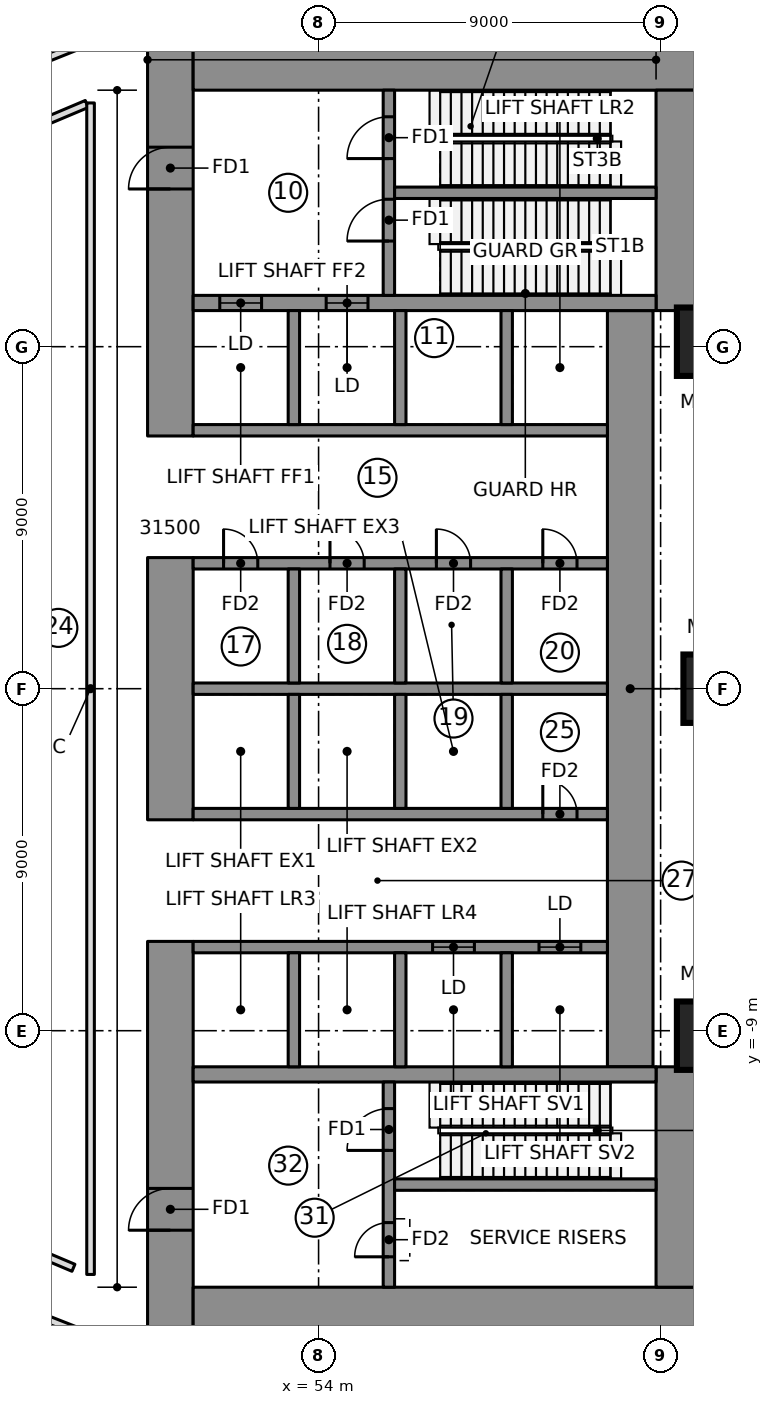
"""IFC4 building model, lengths in metres.
Left out: names, types, materials, properties, quantities, classifications, styles, units other than length and angle.
Written with IfcOpenShell. Run it as: python <this file> out.ifc"""

import sys

from ifc_helpers import new_model, si_unit, direction, frame, frame_2d, origin, origin_2d, place, context, subcontext, project, spatial, rectangle, extrude, element, fill, save


model = new_model("IFC4")
c1 = context("Model", 3, precision=1e-05, world=origin(), true_north=direction((0.0, 1.0)))
c2 = subcontext(c1, "Body", "Model", "MODEL_VIEW")
j1 = project(units=[si_unit("LENGTHUNIT", "METRE"), si_unit("PLANEANGLEUNIT", "RADIAN")], contexts=[c1])
p1 = place(None, origin())
s1 = spatial("IfcSite", under=j1, at=p1, CompositionType="ELEMENT")
p2 = place(p1, origin())
s2 = spatial("IfcBuilding", under=s1, at=p2, CompositionType="ELEMENT")
p3 = place(p2, frame((0.0, 0.0, 29.0)))
s3 = spatial("IfcBuildingStorey", under=s2, at=p3, CompositionType="ELEMENT", Elevation=29.0)
p4 = place(p3, frame((50.1, 6.65, 0.0), z_axis=(0.0, 0.0, 1.0), x_axis=(0.0, 1.0, 0.0)))
e1 = element("IfcWall", 1, at=p4, inside=s3, PredefinedType="SHEAR", context=c2, shape_type="SweptSolid", body=[
    extrude(rectangle(XDim=10.3, YDim=1.2, at=frame_2d((5.15, 0.0))), origin(), (0.0, 0.0, 1.0), 6.0),
])
p5 = place(p4, frame((6.5, 0.0, 0.0)))
e2 = element("IfcOpeningElement", 2, at=p5, cuts=e1, PredefinedType="OPENING", context=c2, shape_type="SweptSolid", body=[
    extrude(rectangle(XDim=1.1, YDim=2.1, at=frame_2d((0.55, 1.05))), frame((0.0, 0.61, 0.0), z_axis=(0.0, -1.0, 0.0), x_axis=(1.0, 0.0, 0.0)), (0.0, 0.0, 1.0), 1.22),
])
p6 = place(p3, frame((50.1, -3.45, 0.0), z_axis=(0.0, 0.0, 1.0), x_axis=(0.0, 1.0, 0.0)))
e3 = element("IfcWall", 3, at=p6, inside=s3, PredefinedType="SHEAR", context=c2, shape_type="SweptSolid", body=[
    extrude(rectangle(XDim=6.9, YDim=1.2, at=frame_2d((3.45, 0.0))), origin(), (0.0, 0.0, 1.0), 6.0),
])
p7 = place(p3, frame((50.1, -16.95, 0.0), z_axis=(0.0, 0.0, 1.0), x_axis=(0.0, 1.0, 0.0)))
e4 = element("IfcWall", 4, at=p7, inside=s3, PredefinedType="SHEAR", context=c2, shape_type="SweptSolid", body=[
    extrude(rectangle(XDim=10.3, YDim=1.2, at=frame_2d((5.15, 0.0))), origin(), (0.0, 0.0, 1.0), 6.0),
])
p8 = place(p7, frame((2.7, 0.0, 0.0)))
e5 = element("IfcOpeningElement", 5, at=p8, cuts=e4, PredefinedType="OPENING", context=c2, shape_type="SweptSolid", body=[
    extrude(rectangle(XDim=1.1, YDim=2.1, at=frame_2d((0.55, 1.05))), frame((0.0, 0.61, 0.0), z_axis=(0.0, -1.0, 0.0), x_axis=(1.0, 0.0, 0.0)), (0.0, 0.0, 1.0), 1.22),
])
for number, where, z_axis, x_axis in (
    (6, (50.7, 16.35, 0.0), (0.0, 0.0, 1.0), (1.0, 0.0, 0.0)),
    (7, (50.7, -16.35, 0.0), (0.0, 0.0, 1.0), (1.0, 0.0, 0.0)),
):
    element("IfcWall", number, at=place(p3, frame(where, z_axis=z_axis, x_axis=x_axis)), inside=s3, PredefinedType="SHEAR", context=c2, shape_type="SweptSolid", body=[
        extrude(rectangle(XDim=13.38, YDim=1.2, at=frame_2d((6.69, 0.0))), origin(), (0.0, 0.0, 1.0), 6.0),
    ])
for number, where, z_axis, x_axis in (
    (8, (63.48, 9.95, 0.0), (0.0, 0.0, 1.0), (0.0, 1.0, 0.0)),
    (9, (63.48, -15.75, 0.0), (0.0, 0.0, 1.0), (0.0, 1.0, 0.0)),
):
    element("IfcWall", number, at=place(p3, frame(where, z_axis=z_axis, x_axis=x_axis)), inside=s3, PredefinedType="SHEAR", context=c2, shape_type="SweptSolid", body=[
        extrude(rectangle(XDim=5.8, YDim=1.2, at=frame_2d((2.9, 0.0))), origin(), (0.0, 0.0, 1.0), 6.0),
    ])
p9 = place(p3, frame((62.2, -9.95, 0.0), z_axis=(0.0, 0.0, 1.0), x_axis=(0.0, 1.0, 0.0)))
e10 = element("IfcWall", 10, at=p9, inside=s3, PredefinedType="SHEAR", context=c2, shape_type="SweptSolid", body=[
    extrude(rectangle(XDim=19.9, YDim=1.2, at=frame_2d((9.95, 0.0))), origin(), (0.0, 0.0, 1.0), 6.0),
])
p10 = place(p3, frame((50.7, 10.15, 0.0), z_axis=(0.0, 0.0, 1.0), x_axis=(1.0, 0.0, 0.0)))
e11 = element("IfcWall", 11, at=p10, inside=s3, PredefinedType="SHEAR", context=c2, shape_type="SweptSolid", body=[
    extrude(rectangle(XDim=12.18, YDim=0.4, at=frame_2d((6.09, 0.0))), origin(), (0.0, 0.0, 1.0), 6.0),
])
p11 = place(p10, frame((0.7, 0.0, 0.0)))
e12 = element("IfcOpeningElement", 12, at=p11, cuts=e11, PredefinedType="OPENING", context=c2, shape_type="SweptSolid", body=[
    extrude(rectangle(XDim=1.1, YDim=2.1, at=frame_2d((0.55, 1.05))), frame((0.0, 0.21, 0.0), z_axis=(0.0, -1.0, 0.0), x_axis=(1.0, 0.0, 0.0)), (0.0, 0.0, 1.0), 0.42),
])
p12 = place(p10, frame((3.5, 0.0, 0.0)))
e13 = element("IfcOpeningElement", 13, at=p12, cuts=e11, PredefinedType="OPENING", context=c2, shape_type="SweptSolid", body=[
    extrude(rectangle(XDim=1.1, YDim=2.1, at=frame_2d((0.55, 1.05))), frame((0.0, 0.21, 0.0), z_axis=(0.0, -1.0, 0.0), x_axis=(1.0, 0.0, 0.0)), (0.0, 0.0, 1.0), 0.42),
])
p13 = place(p3, frame((50.7, -10.15, 0.0), z_axis=(0.0, 0.0, 1.0), x_axis=(1.0, 0.0, 0.0)))
e14 = element("IfcWall", 14, at=p13, inside=s3, PredefinedType="SHEAR", context=c2, shape_type="SweptSolid", body=[
    extrude(rectangle(XDim=12.18, YDim=0.4, at=frame_2d((6.09, 0.0))), origin(), (0.0, 0.0, 1.0), 6.0),
])
p14 = place(p3, frame((50.7, 0.0, 0.0), z_axis=(0.0, 0.0, 1.0), x_axis=(1.0, 0.0, 0.0)))
e15 = element("IfcWall", 15, at=p14, inside=s3, PredefinedType="SHEAR", context=c2, shape_type="SweptSolid", body=[
    extrude(rectangle(XDim=10.9, YDim=0.3, at=frame_2d((5.45, 0.0))), origin(), (0.0, 0.0, 1.0), 6.0),
])
p15 = place(p3, frame((50.7, 3.3, 0.0), z_axis=(0.0, 0.0, 1.0), x_axis=(1.0, 0.0, 0.0)))
e16 = element("IfcWall", 16, at=p15, inside=s3, PredefinedType="SHEAR", context=c2, shape_type="SweptSolid", body=[
    extrude(rectangle(XDim=10.9, YDim=0.3, at=frame_2d((5.45, 0.0))), origin(), (0.0, 0.0, 1.0), 6.0),
])
p16 = place(p15, frame((0.8, 0.0, 0.0)))
e17 = element("IfcOpeningElement", 17, at=p16, cuts=e16, PredefinedType="OPENING", context=c2, shape_type="SweptSolid", body=[
    extrude(rectangle(XDim=0.9, YDim=2.1, at=frame_2d((0.45, 1.05))), frame((0.0, 0.16, 0.0), z_axis=(0.0, -1.0, 0.0), x_axis=(1.0, 0.0, 0.0)), (0.0, 0.0, 1.0), 0.32),
])
p17 = place(p15, frame((3.6, 0.0, 0.0)))
e18 = element("IfcOpeningElement", 18, at=p17, cuts=e16, PredefinedType="OPENING", context=c2, shape_type="SweptSolid", body=[
    extrude(rectangle(XDim=0.9, YDim=2.1, at=frame_2d((0.45, 1.05))), frame((0.0, 0.16, 0.0), z_axis=(0.0, -1.0, 0.0), x_axis=(1.0, 0.0, 0.0)), (0.0, 0.0, 1.0), 0.32),
])
p18 = place(p15, frame((6.4, 0.0, 0.0)))
e19 = element("IfcOpeningElement", 19, at=p18, cuts=e16, PredefinedType="OPENING", context=c2, shape_type="SweptSolid", body=[
    extrude(rectangle(XDim=0.9, YDim=2.1, at=frame_2d((0.45, 1.05))), frame((0.0, 0.16, 0.0), z_axis=(0.0, -1.0, 0.0), x_axis=(1.0, 0.0, 0.0)), (0.0, 0.0, 1.0), 0.32),
])
p19 = place(p15, frame((9.2, 0.0, 0.0)))
e20 = element("IfcOpeningElement", 20, at=p19, cuts=e16, PredefinedType="OPENING", context=c2, shape_type="SweptSolid", body=[
    extrude(rectangle(XDim=0.9, YDim=2.1, at=frame_2d((0.45, 1.05))), frame((0.0, 0.16, 0.0), z_axis=(0.0, -1.0, 0.0), x_axis=(1.0, 0.0, 0.0)), (0.0, 0.0, 1.0), 0.32),
])
p20 = place(p3, frame((50.7, 6.8, 0.0), z_axis=(0.0, 0.0, 1.0), x_axis=(1.0, 0.0, 0.0)))
e21 = element("IfcWall", 21, at=p20, inside=s3, PredefinedType="SHEAR", context=c2, shape_type="SweptSolid", body=[
    extrude(rectangle(XDim=10.9, YDim=0.3, at=frame_2d((5.45, 0.0))), origin(), (0.0, 0.0, 1.0), 6.0),
])
for number, where, z_axis, x_axis in (
    (22, (53.35, 0.15, 0.0), (0.0, 0.0, 1.0), (0.0, 1.0, 0.0)),
    (23, (53.35, 6.95, 0.0), (0.0, 0.0, 1.0), (0.0, 1.0, 0.0)),
    (24, (56.15, 0.15, 0.0), (0.0, 0.0, 1.0), (0.0, 1.0, 0.0)),
    (25, (56.15, 6.95, 0.0), (0.0, 0.0, 1.0), (0.0, 1.0, 0.0)),
    (26, (58.95, 0.15, 0.0), (0.0, 0.0, 1.0), (0.0, 1.0, 0.0)),
    (27, (58.95, 6.95, 0.0), (0.0, 0.0, 1.0), (0.0, 1.0, 0.0)),
):
    element("IfcWall", number, at=place(p3, frame(where, z_axis=z_axis, x_axis=x_axis)), inside=s3, PredefinedType="SHEAR", context=c2, shape_type="SweptSolid", body=[
        extrude(rectangle(XDim=3.0, YDim=0.3, at=frame_2d((1.5, 0.0))), origin(), (0.0, 0.0, 1.0), 6.0),
    ])
p21 = place(p3, frame((50.7, -3.3, 0.0), z_axis=(0.0, 0.0, 1.0), x_axis=(1.0, 0.0, 0.0)))
e28 = element("IfcWall", 28, at=p21, inside=s3, PredefinedType="SHEAR", context=c2, shape_type="SweptSolid", body=[
    extrude(rectangle(XDim=10.9, YDim=0.3, at=frame_2d((5.45, 0.0))), origin(), (0.0, 0.0, 1.0), 6.0),
])
p22 = place(p21, frame((9.2, 0.0, 0.0)))
e29 = element("IfcOpeningElement", 29, at=p22, cuts=e28, PredefinedType="OPENING", context=c2, shape_type="SweptSolid", body=[
    extrude(rectangle(XDim=0.9, YDim=2.1, at=frame_2d((0.45, 1.05))), frame((0.0, 0.16, 0.0), z_axis=(0.0, -1.0, 0.0), x_axis=(1.0, 0.0, 0.0)), (0.0, 0.0, 1.0), 0.32),
])
p23 = place(p3, frame((50.7, -6.8, 0.0), z_axis=(0.0, 0.0, 1.0), x_axis=(1.0, 0.0, 0.0)))
e30 = element("IfcWall", 30, at=p23, inside=s3, PredefinedType="SHEAR", context=c2, shape_type="SweptSolid", body=[
    extrude(rectangle(XDim=10.9, YDim=0.3, at=frame_2d((5.45, 0.0))), origin(), (0.0, 0.0, 1.0), 6.0),
])
p24 = place(p23, frame((6.3, 0.0, 0.0)))
e31 = element("IfcOpeningElement", 31, at=p24, cuts=e30, PredefinedType="OPENING", context=c2, shape_type="SweptSolid", body=[
    extrude(rectangle(XDim=1.1, YDim=2.1, at=frame_2d((0.55, 1.05))), frame((0.0, 0.16, 0.0), z_axis=(0.0, -1.0, 0.0), x_axis=(1.0, 0.0, 0.0)), (0.0, 0.0, 1.0), 0.32),
])
p25 = place(p23, frame((9.1, 0.0, 0.0)))
e32 = element("IfcOpeningElement", 32, at=p25, cuts=e30, PredefinedType="OPENING", context=c2, shape_type="SweptSolid", body=[
    extrude(rectangle(XDim=1.1, YDim=2.1, at=frame_2d((0.55, 1.05))), frame((0.0, 0.16, 0.0), z_axis=(0.0, -1.0, 0.0), x_axis=(1.0, 0.0, 0.0)), (0.0, 0.0, 1.0), 0.32),
])
for number, where, z_axis, x_axis in (
    (33, (53.35, -3.15, 0.0), (0.0, 0.0, 1.0), (0.0, 1.0, 0.0)),
    (34, (53.35, -9.95, 0.0), (0.0, 0.0, 1.0), (0.0, 1.0, 0.0)),
    (35, (56.15, -3.15, 0.0), (0.0, 0.0, 1.0), (0.0, 1.0, 0.0)),
    (36, (56.15, -9.95, 0.0), (0.0, 0.0, 1.0), (0.0, 1.0, 0.0)),
    (37, (58.95, -3.15, 0.0), (0.0, 0.0, 1.0), (0.0, 1.0, 0.0)),
    (38, (58.95, -9.95, 0.0), (0.0, 0.0, 1.0), (0.0, 1.0, 0.0)),
):
    element("IfcWall", number, at=place(p3, frame(where, z_axis=z_axis, x_axis=x_axis)), inside=s3, PredefinedType="SHEAR", context=c2, shape_type="SweptSolid", body=[
        extrude(rectangle(XDim=3.0, YDim=0.3, at=frame_2d((1.5, 0.0))), origin(), (0.0, 0.0, 1.0), 6.0),
    ])
p26 = place(p3, frame((55.85, 10.35, 0.0), z_axis=(0.0, 0.0, 1.0), x_axis=(0.0, 1.0, 0.0)))
e39 = element("IfcWall", 39, at=p26, inside=s3, PredefinedType="SHEAR", context=c2, shape_type="SweptSolid", body=[
    extrude(rectangle(XDim=5.4, YDim=0.3, at=frame_2d((2.7, 0.0))), origin(), (0.0, 0.0, 1.0), 6.0),
])
p27 = place(p26, frame((1.43, 0.0, 0.0)))
e40 = element("IfcOpeningElement", 40, at=p27, cuts=e39, PredefinedType="OPENING", context=c2, shape_type="SweptSolid", body=[
    extrude(rectangle(XDim=1.1, YDim=2.1, at=frame_2d((0.55, 1.05))), frame((0.0, 0.16, 0.0), z_axis=(0.0, -1.0, 0.0), x_axis=(1.0, 0.0, 0.0)), (0.0, 0.0, 1.0), 0.32),
])
p28 = place(p26, frame((3.6, 0.0, 0.0)))
e41 = element("IfcOpeningElement", 41, at=p28, cuts=e39, PredefinedType="OPENING", context=c2, shape_type="SweptSolid", body=[
    extrude(rectangle(XDim=1.1, YDim=2.1, at=frame_2d((0.55, 1.05))), frame((0.0, 0.16, 0.0), z_axis=(0.0, -1.0, 0.0), x_axis=(1.0, 0.0, 0.0)), (0.0, 0.0, 1.0), 0.32),
])
p29 = place(p3, frame((55.85, -15.75, 0.0), z_axis=(0.0, 0.0, 1.0), x_axis=(0.0, 1.0, 0.0)))
e42 = element("IfcWall", 42, at=p29, inside=s3, PredefinedType="SHEAR", context=c2, shape_type="SweptSolid", body=[
    extrude(rectangle(XDim=5.4, YDim=0.3, at=frame_2d((2.7, 0.0))), origin(), (0.0, 0.0, 1.0), 6.0),
])
p30 = place(p29, frame((3.6, 0.0, 0.0)))
e43 = element("IfcOpeningElement", 43, at=p30, cuts=e42, PredefinedType="OPENING", context=c2, shape_type="SweptSolid", body=[
    extrude(rectangle(XDim=1.1, YDim=2.1, at=frame_2d((0.55, 1.05))), frame((0.0, 0.16, 0.0), z_axis=(0.0, -1.0, 0.0), x_axis=(1.0, 0.0, 0.0)), (0.0, 0.0, 1.0), 0.32),
])
p31 = place(p29, frame((0.8, 0.0, 0.0)))
e44 = element("IfcOpeningElement", 44, at=p31, cuts=e42, PredefinedType="OPENING", context=c2, shape_type="SweptSolid", body=[
    extrude(rectangle(XDim=0.9, YDim=2.1, at=frame_2d((0.45, 1.05))), frame((0.0, 0.16, 0.0), z_axis=(0.0, -1.0, 0.0), x_axis=(1.0, 0.0, 0.0)), (0.0, 0.0, 1.0), 0.32),
])
for number, where, z_axis, x_axis in (
    (45, (56.0, 13.05, 0.0), (0.0, 0.0, 1.0), (1.0, 0.0, 0.0)),
    (46, (56.0, -13.05, 0.0), (0.0, 0.0, 1.0), (1.0, 0.0, 0.0)),
):
    element("IfcWall", number, at=place(p3, frame(where, z_axis=z_axis, x_axis=x_axis)), inside=s3, PredefinedType="SHEAR", context=c2, shape_type="SweptSolid", body=[
        extrude(rectangle(XDim=6.88, YDim=0.3, at=frame_2d((3.44, 0.0))), origin(), (0.0, 0.0, 1.0), 6.0),
    ])
for number, where, z_axis, x_axis in (
    (47, (64.328, -9.131, 0.0), (0.0, 0.0, 1.0), (1.0, 0.0, 0.0)),
    (48, (64.5, 0.0, 0.0), (0.0, 0.0, 1.0), (1.0, 0.0, 0.0)),
    (49, (64.328, 9.131, 0.0), (0.0, 0.0, 1.0), (1.0, 0.0, 0.0)),
):
    element("IfcColumn", number, at=place(p3, frame(where, z_axis=z_axis, x_axis=x_axis)), inside=s3, PredefinedType="COLUMN", context=c2, shape_type="SweptSolid", body=[
        extrude(rectangle(XDim=1.8, YDim=1.8, at=origin_2d()), origin(), (0.0, 0.0, 1.0), 6.0),
    ])
p32 = place(p3, frame((43.85, 13.677, 0.0), z_axis=(0.0, 0.0, 1.0), x_axis=(0.921265924084, 0.388933281068, 0.0)))
e50 = element("IfcWall", 50, at=p32, inside=s3, PredefinedType="PARTITIONING", context=c2, shape_type="SweptSolid", body=[
    extrude(rectangle(XDim=4.396, YDim=0.2, at=frame_2d((2.198, 0.0))), origin(), (0.0, 0.0, 1.0), 5.7),
])
p33 = place(p32, frame((1.508, 0.0, 0.0)))
e51 = element("IfcOpeningElement", 51, at=p33, cuts=e50, PredefinedType="OPENING", context=c2, shape_type="SweptSolid", body=[
    extrude(rectangle(XDim=1.0, YDim=2.1, at=frame_2d((0.5, 1.05))), frame((0.0, 0.11, 0.0), z_axis=(0.0, -1.0, 0.0), x_axis=(1.0, 0.0, 0.0)), (0.0, 0.0, 1.0), 0.22),
])
p34 = place(p3, frame((47.55, -15.239, 0.0), z_axis=(0.0, 0.0, 1.0), x_axis=(-0.921269894054, 0.388923877269, 0.0)))
e52 = element("IfcWall", 52, at=p34, inside=s3, PredefinedType="PARTITIONING", context=c2, shape_type="SweptSolid", body=[
    extrude(rectangle(XDim=4.016, YDim=0.2, at=frame_2d((2.008, 0.0))), origin(), (0.0, 0.0, 1.0), 5.7),
])
p35 = place(p3, frame((47.704, 16.936, 0.0), z_axis=(0.0, 0.0, 1.0), x_axis=(-0.927985537407, -0.372616213232, 0.0)))
e53 = element("IfcWall", 53, at=p35, inside=s3, PredefinedType="PARTITIONING", context=c2, shape_type="SweptSolid", body=[
    extrude(rectangle(XDim=0.927, YDim=0.2, at=frame_2d((0.463, 0.0))), origin(), (0.0, 0.0, 1.0), 5.7),
])
p36 = place(p3, frame((46.844, -16.591, 0.0), z_axis=(0.0, 0.0, 1.0), x_axis=(0.930610193452, -0.366011841125, 0.0)))
e54 = element("IfcWall", 54, at=p36, inside=s3, PredefinedType="PARTITIONING", context=c2, shape_type="SweptSolid", body=[
    extrude(rectangle(XDim=0.925, YDim=0.2, at=frame_2d((0.462, 0.0))), origin(), (0.0, 0.0, 1.0), 5.7),
])
p37 = place(p3, frame((48.0, 15.414, 0.0), z_axis=(0.0, 0.0, 1.0), x_axis=(0.0, -1.0, 0.0)))
e55 = element("IfcWall", 55, at=p37, inside=s3, PredefinedType="PARTITIONING", context=c2, shape_type="SweptSolid", body=[
    extrude(rectangle(XDim=30.828, YDim=0.2, at=frame_2d((15.414, 0.0))), origin(), (0.0, 0.0, 1.0), 5.7),
])
p38 = place(p11, origin())
e56 = element("IfcDoor", 56, at=p38, inside=s3, OperationType="DOUBLE_DOOR_SLIDING", PredefinedType="DOOR", context=c2, shape_type="SweptSolid", body=[
    extrude(rectangle(XDim=1.1, YDim=2.1, at=frame_2d((0.55, 1.05))), frame((0.0, 0.025, 0.0), z_axis=(0.0, -1.0, 0.0), x_axis=(1.0, 0.0, 0.0)), (0.0, 0.0, 1.0), 0.05),
])
fill(e12, e56)
p39 = place(p12, origin())
e57 = element("IfcDoor", 57, at=p39, inside=s3, OperationType="DOUBLE_DOOR_SLIDING", PredefinedType="DOOR", context=c2, shape_type="SweptSolid", body=[
    extrude(rectangle(XDim=1.1, YDim=2.1, at=frame_2d((0.55, 1.05))), frame((0.0, 0.025, 0.0), z_axis=(0.0, -1.0, 0.0), x_axis=(1.0, 0.0, 0.0)), (0.0, 0.0, 1.0), 0.05),
])
fill(e13, e57)
p40 = place(p24, origin())
e58 = element("IfcDoor", 58, at=p40, inside=s3, OperationType="DOUBLE_DOOR_SLIDING", PredefinedType="DOOR", context=c2, shape_type="SweptSolid", body=[
    extrude(rectangle(XDim=1.1, YDim=2.1, at=frame_2d((0.55, 1.05))), frame((0.0, 0.025, 0.0), z_axis=(0.0, -1.0, 0.0), x_axis=(1.0, 0.0, 0.0)), (0.0, 0.0, 1.0), 0.05),
])
fill(e31, e58)
p41 = place(p25, origin())
e59 = element("IfcDoor", 59, at=p41, inside=s3, OperationType="DOUBLE_DOOR_SLIDING", PredefinedType="DOOR", context=c2, shape_type="SweptSolid", body=[
    extrude(rectangle(XDim=1.1, YDim=2.1, at=frame_2d((0.55, 1.05))), frame((0.0, 0.025, 0.0), z_axis=(0.0, -1.0, 0.0), x_axis=(1.0, 0.0, 0.0)), (0.0, 0.0, 1.0), 0.05),
])
fill(e32, e59)
p42 = place(p27, origin())
e60 = element("IfcDoor", 60, at=p42, inside=s3, OperationType="SINGLE_SWING_RIGHT", PredefinedType="DOOR", context=c2, shape_type="SweptSolid", body=[
    extrude(rectangle(XDim=1.1, YDim=2.1, at=frame_2d((0.55, 1.05))), frame((0.0, 0.025, 0.0), z_axis=(0.0, -1.0, 0.0), x_axis=(1.0, 0.0, 0.0)), (0.0, 0.0, 1.0), 0.05),
])
fill(e40, e60)
p43 = place(p28, origin())
e61 = element("IfcDoor", 61, at=p43, inside=s3, OperationType="SINGLE_SWING_RIGHT", PredefinedType="DOOR", context=c2, shape_type="SweptSolid", body=[
    extrude(rectangle(XDim=1.1, YDim=2.1, at=frame_2d((0.55, 1.05))), frame((0.0, 0.025, 0.0), z_axis=(0.0, -1.0, 0.0), x_axis=(1.0, 0.0, 0.0)), (0.0, 0.0, 1.0), 0.05),
])
fill(e41, e61)
p44 = place(p30, origin())
e62 = element("IfcDoor", 62, at=p44, inside=s3, OperationType="SINGLE_SWING_RIGHT", PredefinedType="DOOR", context=c2, shape_type="SweptSolid", body=[
    extrude(rectangle(XDim=1.1, YDim=2.1, at=frame_2d((0.55, 1.05))), frame((0.0, 0.025, 0.0), z_axis=(0.0, -1.0, 0.0), x_axis=(1.0, 0.0, 0.0)), (0.0, 0.0, 1.0), 0.05),
])
fill(e43, e62)
p45 = place(p5, origin())
e63 = element("IfcDoor", 63, at=p45, inside=s3, OperationType="SINGLE_SWING_RIGHT", PredefinedType="DOOR", context=c2, shape_type="SweptSolid", body=[
    extrude(rectangle(XDim=1.1, YDim=2.1, at=frame_2d((0.55, 1.05))), frame((0.0, 0.025, 0.0), z_axis=(0.0, -1.0, 0.0), x_axis=(1.0, 0.0, 0.0)), (0.0, 0.0, 1.0), 0.05),
])
fill(e2, e63)
p46 = place(p8, origin())
e64 = element("IfcDoor", 64, at=p46, inside=s3, OperationType="SINGLE_SWING_RIGHT", PredefinedType="DOOR", context=c2, shape_type="SweptSolid", body=[
    extrude(rectangle(XDim=1.1, YDim=2.1, at=frame_2d((0.55, 1.05))), frame((0.0, 0.025, 0.0), z_axis=(0.0, -1.0, 0.0), x_axis=(1.0, 0.0, 0.0)), (0.0, 0.0, 1.0), 0.05),
])
fill(e5, e64)
p47 = place(p31, origin())
e65 = element("IfcDoor", 65, at=p47, inside=s3, OperationType="SINGLE_SWING_LEFT", PredefinedType="DOOR", context=c2, shape_type="SweptSolid", body=[
    extrude(rectangle(XDim=0.9, YDim=2.1, at=frame_2d((0.45, 1.05))), frame((0.0, 0.025, 0.0), z_axis=(0.0, -1.0, 0.0), x_axis=(1.0, 0.0, 0.0)), (0.0, 0.0, 1.0), 0.05),
])
fill(e44, e65)
p48 = place(p16, origin())
e66 = element("IfcDoor", 66, at=p48, inside=s3, OperationType="SINGLE_SWING_LEFT", PredefinedType="DOOR", context=c2, shape_type="SweptSolid", body=[
    extrude(rectangle(XDim=0.9, YDim=2.1, at=frame_2d((0.45, 1.05))), frame((0.0, 0.025, 0.0), z_axis=(0.0, -1.0, 0.0), x_axis=(1.0, 0.0, 0.0)), (0.0, 0.0, 1.0), 0.05),
])
fill(e17, e66)
p49 = place(p17, origin())
e67 = element("IfcDoor", 67, at=p49, inside=s3, OperationType="SINGLE_SWING_LEFT", PredefinedType="DOOR", context=c2, shape_type="SweptSolid", body=[
    extrude(rectangle(XDim=0.9, YDim=2.1, at=frame_2d((0.45, 1.05))), frame((0.0, 0.025, 0.0), z_axis=(0.0, -1.0, 0.0), x_axis=(1.0, 0.0, 0.0)), (0.0, 0.0, 1.0), 0.05),
])
fill(e18, e67)
p50 = place(p18, origin())
e68 = element("IfcDoor", 68, at=p50, inside=s3, OperationType="SINGLE_SWING_LEFT", PredefinedType="DOOR", context=c2, shape_type="SweptSolid", body=[
    extrude(rectangle(XDim=0.9, YDim=2.1, at=frame_2d((0.45, 1.05))), frame((0.0, 0.025, 0.0), z_axis=(0.0, -1.0, 0.0), x_axis=(1.0, 0.0, 0.0)), (0.0, 0.0, 1.0), 0.05),
])
fill(e19, e68)
p51 = place(p19, origin())
e69 = element("IfcDoor", 69, at=p51, inside=s3, OperationType="SINGLE_SWING_LEFT", PredefinedType="DOOR", context=c2, shape_type="SweptSolid", body=[
    extrude(rectangle(XDim=0.9, YDim=2.1, at=frame_2d((0.45, 1.05))), frame((0.0, 0.025, 0.0), z_axis=(0.0, -1.0, 0.0), x_axis=(1.0, 0.0, 0.0)), (0.0, 0.0, 1.0), 0.05),
])
fill(e20, e69)
p52 = place(p22, origin())
e70 = element("IfcDoor", 70, at=p52, inside=s3, OperationType="SINGLE_SWING_LEFT", PredefinedType="DOOR", context=c2, shape_type="SweptSolid", body=[
    extrude(rectangle(XDim=0.9, YDim=2.1, at=frame_2d((0.45, 1.05))), frame((0.0, 0.025, 0.0), z_axis=(0.0, -1.0, 0.0), x_axis=(1.0, 0.0, 0.0)), (0.0, 0.0, 1.0), 0.05),
])
fill(e29, e70)
save(model, sys.argv[1])
